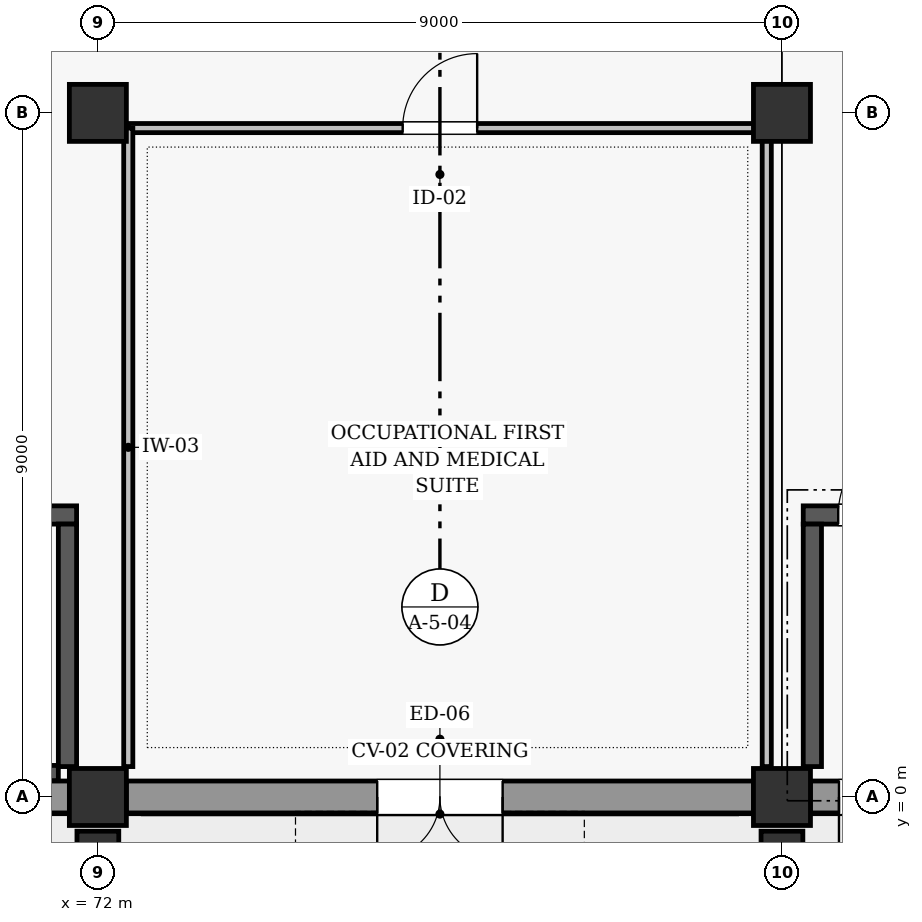
"""IFC4 building model, lengths in metres.
Left out: names, types, materials, properties, quantities, classifications, styles, units other than length and angle.
Written with IfcOpenShell. Run it as: python <this file> out.ifc"""

import sys

from ifc_helpers import new_model, si_unit, direction, frame, frame_2d, origin, origin_2d, place, context, subcontext, project, spatial, rectangle, extrude, element, fill, save


model = new_model("IFC4")
c1 = context("Model", 3, precision=1e-05, world=origin(), true_north=direction((0.0, 1.0)))
c2 = subcontext(c1, "Body", "Model", "MODEL_VIEW")
j1 = project(units=[si_unit("LENGTHUNIT", "METRE"), si_unit("PLANEANGLEUNIT", "RADIAN")], contexts=[c1])
p1 = place(None, origin())
s1 = spatial("IfcSite", under=j1, at=p1, CompositionType="ELEMENT")
p2 = place(p1, origin())
s2 = spatial("IfcBuilding", under=s1, at=p2, CompositionType="ELEMENT")
p3 = place(p2, origin())
s3 = spatial("IfcBuildingStorey", under=s2, at=p3, CompositionType="ELEMENT", Elevation=0.0)
for number, where, z_axis, x_axis in (
    (1, (72.0, 0.0, 0.0), (0.0, 0.0, 1.0), (1.0, 0.0, 0.0)),
    (2, (72.0, 9.0, 0.0), (0.0, 0.0, 1.0), (1.0, 0.0, 0.0)),
    (3, (81.0, 0.0, 0.0), (0.0, 0.0, 1.0), (1.0, 0.0, 0.0)),
    (4, (81.0, 9.0, 0.0), (0.0, 0.0, 1.0), (1.0, 0.0, 0.0)),
):
    element("IfcColumn", number, at=place(p3, frame(where, z_axis=z_axis, x_axis=x_axis)), inside=s3, PredefinedType="COLUMN", context=c2, shape_type="SweptSolid", body=[
        extrude(rectangle(XDim=0.75, YDim=0.75, at=origin_2d()), origin(), (0.0, 0.0, 1.0), 4.8),
    ])
for number, where, z_axis, x_axis in (
    (5, (72.0, -0.85, 0.0), (0.0, 0.0, 1.0), (1.0, 0.0, 0.0)),
    (6, (81.0, -0.85, 0.0), (0.0, 0.0, 1.0), (1.0, 0.0, 0.0)),
):
    element("IfcColumn", number, at=place(p3, frame(where, z_axis=z_axis, x_axis=x_axis)), inside=s3, PredefinedType="PILASTER", context=c2, shape_type="SweptSolid", body=[
        extrude(rectangle(XDim=0.55, YDim=0.8, at=origin_2d()), origin(), (0.0, 0.0, 1.0), 4.8),
    ])
p4 = place(p3, frame((63.373, 0.0, 0.0), z_axis=(0.0, 0.0, 1.0), x_axis=(1.0, 0.0, 0.0)))
e7 = element("IfcWall", 7, at=p4, inside=s3, PredefinedType="SOLIDWALL", context=c2, shape_type="SweptSolid", body=[
    extrude(rectangle(XDim=8.254, YDim=0.42, at=frame_2d((4.127, 0.0))), origin(), (0.0, 0.0, 1.0), 3.842),
])
p5 = place(p4, frame((0.347, 0.0, 0.0)))
e8 = element("IfcOpeningElement", 8, at=p5, cuts=e7, PredefinedType="OPENING", context=c2, shape_type="SweptSolid", body=[
    extrude(rectangle(XDim=1.12, YDim=2.14, at=frame_2d((0.56, 1.07))), frame((0.0, 0.22, 0.0), z_axis=(0.0, -1.0, 0.0), x_axis=(1.0, 0.0, 0.0)), (0.0, 0.0, 1.0), 0.44),
])
p6 = place(p3, frame((72.373, 0.0, 0.0), z_axis=(0.0, 0.0, 1.0), x_axis=(1.0, 0.0, 0.0)))
e9 = element("IfcWall", 9, at=p6, inside=s3, PredefinedType="SOLIDWALL", context=c2, shape_type="SweptSolid", body=[
    extrude(rectangle(XDim=8.254, YDim=0.42, at=frame_2d((4.127, 0.0))), origin(), (0.0, 0.0, 1.0), 3.842),
])
p7 = place(p6, frame((3.302, 0.0, 0.0)))
e10 = element("IfcOpeningElement", 10, at=p7, cuts=e9, PredefinedType="OPENING", context=c2, shape_type="SweptSolid", body=[
    extrude(rectangle(XDim=1.65, YDim=2.28, at=frame_2d((0.825, 1.14))), frame((0.0, 0.22, 0.0), z_axis=(0.0, -1.0, 0.0), x_axis=(1.0, 0.0, 0.0)), (0.0, 0.0, 1.0), 0.44),
])
p8 = place(p3, frame((81.373, 0.0, 0.0), z_axis=(0.0, 0.0, 1.0), x_axis=(1.0, 0.0, 0.0)))
e11 = element("IfcWall", 11, at=p8, inside=s3, PredefinedType="SOLIDWALL", context=c2, shape_type="SweptSolid", body=[
    extrude(rectangle(XDim=8.254, YDim=0.42, at=frame_2d((4.127, 0.0))), origin(), (0.0, 0.0, 1.0), 3.842),
])
p9 = place(p8, frame((0.377, 0.0, 0.0)))
e12 = element("IfcOpeningElement", 12, at=p9, cuts=e11, PredefinedType="OPENING", context=c2, shape_type="SweptSolid", body=[
    extrude(rectangle(XDim=1.06, YDim=2.1, at=frame_2d((0.53, 1.05))), frame((0.0, 0.22, 0.0), z_axis=(0.0, -1.0, 0.0), x_axis=(1.0, 0.0, 0.0)), (0.0, 0.0, 1.0), 0.44),
])
p10 = place(p3, frame((65.04, 0.315, 0.0), z_axis=(0.0, 0.0, 1.0), x_axis=(1.0, 0.0, 0.0)))
e13 = element("IfcWall", 13, at=p10, inside=s3, PredefinedType="SHEAR", context=c2, shape_type="SweptSolid", body=[
    extrude(rectangle(XDim=6.44, YDim=0.2, at=frame_2d((3.22, 0.0))), origin(), (0.0, 0.0, 1.0), 4.55),
])
p11 = place(p3, frame((63.28, 3.71, 0.0), z_axis=(0.0, 0.0, 1.0), x_axis=(1.0, 0.0, 0.0)))
e14 = element("IfcWall", 14, at=p11, inside=s3, PredefinedType="SHEAR", context=c2, shape_type="SweptSolid", body=[
    extrude(rectangle(XDim=8.44, YDim=0.24, at=frame_2d((4.22, 0.0))), origin(), (0.0, 0.0, 1.0), 4.55),
])
p12 = place(p11, frame((0.46, 0.0, 0.0)))
e15 = element("IfcOpeningElement", 15, at=p12, cuts=e14, PredefinedType="OPENING", context=c2, shape_type="SweptSolid", body=[
    extrude(rectangle(XDim=1.08, YDim=2.08, at=frame_2d((0.54, 1.04))), frame((0.0, 0.13, 0.0), z_axis=(0.0, -1.0, 0.0), x_axis=(1.0, 0.0, 0.0)), (0.0, 0.0, 1.0), 0.26),
])
p13 = place(p3, frame((71.6, 0.4, 0.0), z_axis=(0.0, 0.0, 1.0), x_axis=(0.0, 1.0, 0.0)))
e16 = element("IfcWall", 16, at=p13, inside=s3, PredefinedType="SHEAR", context=c2, shape_type="SweptSolid", body=[
    extrude(rectangle(XDim=3.19, YDim=0.24, at=frame_2d((1.595, 0.0))), origin(), (0.0, 0.0, 1.0), 4.55),
])
p14 = place(p3, frame((81.28, 3.71, 0.0), z_axis=(0.0, 0.0, 1.0), x_axis=(1.0, 0.0, 0.0)))
e17 = element("IfcWall", 17, at=p14, inside=s3, PredefinedType="SHEAR", context=c2, shape_type="SweptSolid", body=[
    extrude(rectangle(XDim=8.44, YDim=0.24, at=frame_2d((4.22, 0.0))), origin(), (0.0, 0.0, 1.0), 4.55),
])
p15 = place(p14, frame((0.46, 0.0, 0.0)))
e18 = element("IfcOpeningElement", 18, at=p15, cuts=e17, PredefinedType="OPENING", context=c2, shape_type="SweptSolid", body=[
    extrude(rectangle(XDim=1.08, YDim=2.08, at=frame_2d((0.54, 1.04))), frame((0.0, 0.13, 0.0), z_axis=(0.0, -1.0, 0.0), x_axis=(1.0, 0.0, 0.0)), (0.0, 0.0, 1.0), 0.26),
])
p16 = place(p3, frame((81.4, 0.4, 0.0), z_axis=(0.0, 0.0, 1.0), x_axis=(0.0, 1.0, 0.0)))
e19 = element("IfcWall", 19, at=p16, inside=s3, PredefinedType="SHEAR", context=c2, shape_type="SweptSolid", body=[
    extrude(rectangle(XDim=3.19, YDim=0.24, at=frame_2d((1.595, 0.0))), origin(), (0.0, 0.0, 1.0), 4.55),
])
p17 = place(p3, frame((72.4, 8.8, 0.0), z_axis=(0.0, 0.0, 1.0), x_axis=(1.0, 0.0, 0.0)))
e20 = element("IfcWall", 20, at=p17, inside=s3, PredefinedType="PARTITIONING", context=c2, shape_type="SweptSolid", body=[
    extrude(rectangle(XDim=8.4, YDim=0.12, at=frame_2d((4.2, 0.0))), origin(), (0.0, 0.0, 1.0), 3.795),
])
p18 = place(p17, frame((3.61, 0.0, 0.0)))
e21 = element("IfcOpeningElement", 21, at=p18, cuts=e20, PredefinedType="OPENING", context=c2, shape_type="SweptSolid", body=[
    extrude(rectangle(XDim=0.98, YDim=2.08, at=frame_2d((0.49, 1.04))), frame((0.0, 0.07, 0.0), z_axis=(0.0, -1.0, 0.0), x_axis=(1.0, 0.0, 0.0)), (0.0, 0.0, 1.0), 0.14),
])
p19 = place(p3, frame((72.4, 0.4, 0.0), z_axis=(0.0, 0.0, 1.0), x_axis=(0.0, 1.0, 0.0)))
e22 = element("IfcWall", 22, at=p19, inside=s3, PredefinedType="PARTITIONING", context=c2, shape_type="SweptSolid", body=[
    extrude(rectangle(XDim=8.4, YDim=0.12, at=frame_2d((4.2, 0.0))), origin(), (0.0, 0.0, 1.0), 3.795),
])
p20 = place(p3, frame((80.8, 0.4, 0.0), z_axis=(0.0, 0.0, 1.0), x_axis=(0.0, 1.0, 0.0)))
e23 = element("IfcWall", 23, at=p20, inside=s3, PredefinedType="PARTITIONING", context=c2, shape_type="SweptSolid", body=[
    extrude(rectangle(XDim=8.4, YDim=0.12, at=frame_2d((4.2, 0.0))), origin(), (0.0, 0.0, 1.0), 3.895),
])
p21 = place(p7, frame((1.65, 0.0, 0.0), z_axis=(0.0, 0.0, 1.0), x_axis=(-1.0, 0.0, 0.0)))
e24 = element("IfcDoor", 24, at=p21, inside=s3, OperationType="DOUBLE_SWING_LEFT", PredefinedType="DOOR", context=c2, shape_type="SweptSolid", body=[
    extrude(rectangle(XDim=1.65, YDim=2.28, at=frame_2d((0.825, 1.14))), frame((0.0, 0.025, 0.0), z_axis=(0.0, -1.0, 0.0), x_axis=(1.0, 0.0, 0.0)), (0.0, 0.0, 1.0), 0.05),
])
fill(e10, e24)
p22 = place(p9, frame((1.06, 0.0, 0.0), z_axis=(0.0, 0.0, 1.0), x_axis=(-1.0, 0.0, 0.0)))
e25 = element("IfcDoor", 25, at=p22, inside=s3, OperationType="SINGLE_SWING_LEFT", PredefinedType="DOOR", context=c2, shape_type="SweptSolid", body=[
    extrude(rectangle(XDim=1.06, YDim=2.1, at=frame_2d((0.53, 1.05))), frame((0.0, 0.025, 0.0), z_axis=(0.0, -1.0, 0.0), x_axis=(1.0, 0.0, 0.0)), (0.0, 0.0, 1.0), 0.05),
])
fill(e12, e25)
p23 = place(p15, origin())
e26 = element("IfcDoor", 26, at=p23, inside=s3, OperationType="SINGLE_SWING_RIGHT", PredefinedType="DOOR", context=c2, shape_type="SweptSolid", body=[
    extrude(rectangle(XDim=1.08, YDim=2.08, at=frame_2d((0.54, 1.04))), frame((0.0, 0.025, 0.0), z_axis=(0.0, -1.0, 0.0), x_axis=(1.0, 0.0, 0.0)), (0.0, 0.0, 1.0), 0.05),
])
fill(e18, e26)
p24 = place(p18, origin())
e27 = element("IfcDoor", 27, at=p24, inside=s3, OperationType="SINGLE_SWING_RIGHT", PredefinedType="DOOR", context=c2, shape_type="SweptSolid", body=[
    extrude(rectangle(XDim=0.98, YDim=2.08, at=frame_2d((0.49, 1.04))), frame((0.0, 0.025, 0.0), z_axis=(0.0, -1.0, 0.0), x_axis=(1.0, 0.0, 0.0)), (0.0, 0.0, 1.0), 0.05),
])
fill(e21, e27)
save(model, sys.argv[1])
